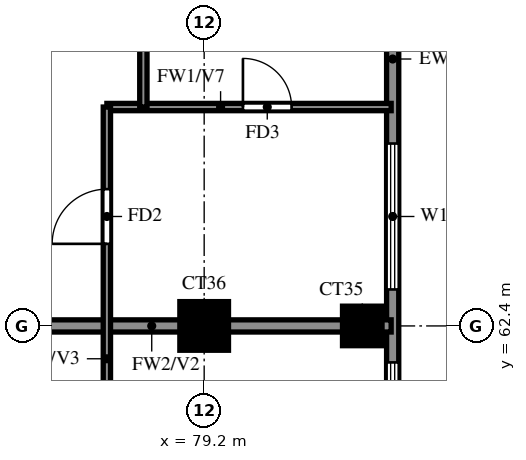
"""IFC4 building model, lengths in metres.
Left out: names, types, materials, properties, quantities, classifications, styles, units other than length and angle.
Written with IfcOpenShell. Run it as: python <this file> out.ifc"""

import sys

from ifc_helpers import new_model, si_unit, direction, frame, frame_2d, origin, origin_2d, place, context, subcontext, project, spatial, rectangle, extrude, source, transform, mapped, element, fill, save


model = new_model("IFC4")
c1 = context("Model", 3, precision=1e-05, world=origin(), true_north=direction((0.0, 1.0)))
c2 = subcontext(c1, "Body", "Model", "MODEL_VIEW")
j1 = project(units=[si_unit("LENGTHUNIT", "METRE"), si_unit("PLANEANGLEUNIT", "RADIAN")], contexts=[c1])
p1 = place(None, origin())
s1 = spatial("IfcSite", under=j1, at=p1, CompositionType="ELEMENT")
p2 = place(p1, origin())
s2 = spatial("IfcBuilding", under=s1, at=p2, CompositionType="ELEMENT")
p3 = place(p2, frame((0.0, 0.0, 232.5)))
s3 = spatial("IfcBuildingStorey", under=s2, at=p3, CompositionType="ELEMENT", Elevation=232.5)
m1 = source(origin(), c2, "Body", "SweptSolid", [
    extrude(rectangle(XDim=0.8, YDim=0.8, at=origin_2d()), origin(), (0.0, 0.0, 1.0), 3.22),
])
p4 = place(p3, frame((79.2, 62.4, 0.0), z_axis=(0.0, 0.0, 1.0), x_axis=(1.0, 0.0, 0.0)))
e1 = element("IfcColumn", 1, at=p4, inside=s3, PredefinedType="COLUMN", context=c2, shape_type="MappedRepresentation", body=[
    mapped(m1, transform((0.0, 0.0, 0.0))),
])
m2 = source(origin(), c2, "Body", "SweptSolid", [
    extrude(rectangle(XDim=0.65, YDim=0.65, at=origin_2d()), origin(), (0.0, 0.0, 1.0), 3.22),
])
p5 = place(p3, frame((81.8, 62.4, 0.0), z_axis=(0.0, 0.0, 1.0), x_axis=(1.0, 0.0, 0.0)))
e2 = element("IfcColumn", 2, at=p5, inside=s3, PredefinedType="COLUMN", context=c2, shape_type="MappedRepresentation", body=[
    mapped(m2, transform((0.0, 0.0, 0.0))),
])
p6 = place(p3, frame((82.3, 48.2, 0.0), z_axis=(0.0, 0.0, 1.0), x_axis=(0.0, 1.0, 0.0)))
e3 = element("IfcWall", 3, at=p6, inside=s3, PredefinedType="SOLIDWALL", context=c2, shape_type="SweptSolid", body=[
    extrude(rectangle(XDim=28.6, YDim=0.2, at=frame_2d((14.3, 0.0))), origin(), (0.0, 0.0, 1.0), 3.22),
])
p7 = place(p6, frame((4.3, 0.0, 0.0)))
e4 = element("IfcOpeningElement", 4, at=p7, cuts=e3, PredefinedType="OPENING", context=c2, shape_type="SweptSolid", body=[
    extrude(rectangle(XDim=1.8, YDim=2.4, at=frame_2d((0.9, 1.2))), frame((0.0, 0.11, 0.0), z_axis=(0.0, -1.0, 0.0), x_axis=(1.0, 0.0, 0.0)), (0.0, 0.0, 1.0), 0.22),
])
p8 = place(p6, frame((0.6, 0.0, 0.6)))
e5 = element("IfcOpeningElement", 5, at=p8, cuts=e3, PredefinedType="OPENING", context=c2, shape_type="SweptSolid", body=[
    extrude(rectangle(XDim=1.2, YDim=2.4, at=frame_2d((0.6, 1.2))), frame((0.0, 0.11, 0.0), z_axis=(0.0, -1.0, 0.0), x_axis=(1.0, 0.0, 0.0)), (0.0, 0.0, 1.0), 0.22),
])
p9 = place(p6, frame((2.95, 0.0, 0.6)))
e6 = element("IfcOpeningElement", 6, at=p9, cuts=e3, PredefinedType="OPENING", context=c2, shape_type="SweptSolid", body=[
    extrude(rectangle(XDim=0.9, YDim=2.4, at=frame_2d((0.45, 1.2))), frame((0.0, 0.11, 0.0), z_axis=(0.0, -1.0, 0.0), x_axis=(1.0, 0.0, 0.0)), (0.0, 0.0, 1.0), 0.22),
])
p10 = place(p6, frame((11.2, 0.0, 0.6)))
e7 = element("IfcOpeningElement", 7, at=p10, cuts=e3, PredefinedType="OPENING", context=c2, shape_type="SweptSolid", body=[
    extrude(rectangle(XDim=2.4, YDim=2.4, at=frame_2d((1.2, 1.2))), frame((0.0, 0.11, 0.0), z_axis=(0.0, -1.0, 0.0), x_axis=(1.0, 0.0, 0.0)), (0.0, 0.0, 1.0), 0.22),
])
p11 = place(p6, frame((7.45, 0.0, 1.5)))
e8 = element("IfcOpeningElement", 8, at=p11, cuts=e3, PredefinedType="OPENING", context=c2, shape_type="SweptSolid", body=[
    extrude(rectangle(XDim=0.9, YDim=0.9, at=frame_2d((0.45, 0.45))), frame((0.0, 0.11, 0.0), z_axis=(0.0, -1.0, 0.0), x_axis=(1.0, 0.0, 0.0)), (0.0, 0.0, 1.0), 0.22),
])
p12 = place(p6, frame((9.55, 0.0, 1.5)))
e9 = element("IfcOpeningElement", 9, at=p12, cuts=e3, PredefinedType="OPENING", context=c2, shape_type="SweptSolid", body=[
    extrude(rectangle(XDim=0.9, YDim=0.9, at=frame_2d((0.45, 0.45))), frame((0.0, 0.11, 0.0), z_axis=(0.0, -1.0, 0.0), x_axis=(1.0, 0.0, 0.0)), (0.0, 0.0, 1.0), 0.22),
])
p13 = place(p6, frame((14.8, 0.0, 0.6)))
e10 = element("IfcOpeningElement", 10, at=p13, cuts=e3, PredefinedType="OPENING", context=c2, shape_type="SweptSolid", body=[
    extrude(rectangle(XDim=2.4, YDim=2.4, at=frame_2d((1.2, 1.2))), frame((0.0, 0.11, 0.0), z_axis=(0.0, -1.0, 0.0), x_axis=(1.0, 0.0, 0.0)), (0.0, 0.0, 1.0), 0.22),
])
p14 = place(p6, frame((19.15, 0.0, 1.5)))
e11 = element("IfcOpeningElement", 11, at=p14, cuts=e3, PredefinedType="OPENING", context=c2, shape_type="SweptSolid", body=[
    extrude(rectangle(XDim=0.9, YDim=0.9, at=frame_2d((0.45, 0.45))), frame((0.0, 0.11, 0.0), z_axis=(0.0, -1.0, 0.0), x_axis=(1.0, 0.0, 0.0)), (0.0, 0.0, 1.0), 0.22),
])
p15 = place(p6, frame((22.0, 0.0, 0.6)))
e12 = element("IfcOpeningElement", 12, at=p15, cuts=e3, PredefinedType="OPENING", context=c2, shape_type="SweptSolid", body=[
    extrude(rectangle(XDim=2.4, YDim=2.4, at=frame_2d((1.2, 1.2))), frame((0.0, 0.11, 0.0), z_axis=(0.0, -1.0, 0.0), x_axis=(1.0, 0.0, 0.0)), (0.0, 0.0, 1.0), 0.22),
])
p16 = place(p6, frame((25.5, 0.0, 0.6)))
e13 = element("IfcOpeningElement", 13, at=p16, cuts=e3, PredefinedType="OPENING", context=c2, shape_type="SweptSolid", body=[
    extrude(rectangle(XDim=2.4, YDim=2.4, at=frame_2d((1.2, 1.2))), frame((0.0, 0.11, 0.0), z_axis=(0.0, -1.0, 0.0), x_axis=(1.0, 0.0, 0.0)), (0.0, 0.0, 1.0), 0.22),
])
p17 = place(p3, frame((74.4, 62.4, 0.0), z_axis=(0.0, 0.0, 1.0), x_axis=(1.0, 0.0, 0.0)))
e14 = element("IfcWall", 14, at=p17, inside=s3, PredefinedType="SOLIDWALL", context=c2, shape_type="SweptSolid", body=[
    extrude(rectangle(XDim=7.875, YDim=0.2, at=frame_2d((3.938, 0.0))), origin(), (0.0, 0.0, 1.0), 3.22),
])
p18 = place(p3, frame((77.6, 66.0, 0.0), z_axis=(0.0, 0.0, 1.0), x_axis=(1.0, 0.0, 0.0)))
e15 = element("IfcWall", 15, at=p18, inside=s3, PredefinedType="PARTITIONING", context=c2, shape_type="SweptSolid", body=[
    extrude(rectangle(XDim=4.675, YDim=0.12, at=frame_2d((2.337, 0.0))), origin(), (0.0, 0.0, 1.0), 2.32),
])
p19 = place(p18, frame((2.238, 0.0, 0.0)))
e16 = element("IfcOpeningElement", 16, at=p19, cuts=e15, PredefinedType="OPENING", context=c2, shape_type="SweptSolid", body=[
    extrude(rectangle(XDim=0.8, YDim=2.1, at=frame_2d((0.4, 1.05))), frame((0.0, 0.07, 0.0), z_axis=(0.0, -1.0, 0.0), x_axis=(1.0, 0.0, 0.0)), (0.0, 0.0, 1.0), 0.14),
])
p20 = place(p3, frame((77.6, 58.8, 0.0), z_axis=(0.0, 0.0, 1.0), x_axis=(0.0, 1.0, 0.0)))
e17 = element("IfcWall", 17, at=p20, inside=s3, PredefinedType="PARTITIONING", context=c2, shape_type="SweptSolid", body=[
    extrude(rectangle(XDim=7.2, YDim=0.12, at=frame_2d((3.6, 0.0))), origin(), (0.0, 0.0, 1.0), 3.22),
])
p21 = place(p20, frame((1.35, 0.0, 0.0)))
e18 = element("IfcOpeningElement", 18, at=p21, cuts=e17, PredefinedType="OPENING", context=c2, shape_type="SweptSolid", body=[
    extrude(rectangle(XDim=0.9, YDim=2.1, at=frame_2d((0.45, 1.05))), frame((0.0, 0.07, 0.0), z_axis=(0.0, -1.0, 0.0), x_axis=(1.0, 0.0, 0.0)), (0.0, 0.0, 1.0), 0.14),
])
p22 = place(p20, frame((4.95, 0.0, 0.0)))
e19 = element("IfcOpeningElement", 19, at=p22, cuts=e17, PredefinedType="OPENING", context=c2, shape_type="SweptSolid", body=[
    extrude(rectangle(XDim=0.9, YDim=2.1, at=frame_2d((0.45, 1.05))), frame((0.0, 0.07, 0.0), z_axis=(0.0, -1.0, 0.0), x_axis=(1.0, 0.0, 0.0)), (0.0, 0.0, 1.0), 0.14),
])
p23 = place(p3, frame((78.2, 66.0, 0.0), z_axis=(0.0, 0.0, 1.0), x_axis=(0.0, 1.0, 0.0)))
e20 = element("IfcWall", 20, at=p23, inside=s3, PredefinedType="PARTITIONING", context=c2, shape_type="SweptSolid", body=[
    extrude(rectangle(XDim=3.6, YDim=0.12, at=frame_2d((1.8, 0.0))), origin(), (0.0, 0.0, 1.0), 3.22),
])
p24 = place(p10, origin())
e21 = element("IfcWindow", 21, at=p24, inside=s3, PartitioningType="DOUBLE_PANEL_VERTICAL", PredefinedType="WINDOW", context=c2, shape_type="SweptSolid", body=[
    extrude(rectangle(XDim=2.4, YDim=2.4, at=frame_2d((1.2, 1.2))), frame((0.0, 0.03, 0.0), z_axis=(0.0, -1.0, 0.0), x_axis=(1.0, 0.0, 0.0)), (0.0, 0.0, 1.0), 0.06),
])
fill(e7, e21)
p25 = place(p13, origin())
e22 = element("IfcWindow", 22, at=p25, inside=s3, PartitioningType="DOUBLE_PANEL_VERTICAL", PredefinedType="WINDOW", context=c2, shape_type="SweptSolid", body=[
    extrude(rectangle(XDim=2.4, YDim=2.4, at=frame_2d((1.2, 1.2))), frame((0.0, 0.03, 0.0), z_axis=(0.0, -1.0, 0.0), x_axis=(1.0, 0.0, 0.0)), (0.0, 0.0, 1.0), 0.06),
])
fill(e10, e22)
p26 = place(p22, origin())
e23 = element("IfcDoor", 23, at=p26, inside=s3, OperationType="SINGLE_SWING_RIGHT", PredefinedType="DOOR", context=c2, shape_type="SweptSolid", body=[
    extrude(rectangle(XDim=0.9, YDim=2.1, at=frame_2d((0.45, 1.05))), frame((0.0, 0.025, 0.0), z_axis=(0.0, -1.0, 0.0), x_axis=(1.0, 0.0, 0.0)), (0.0, 0.0, 1.0), 0.05),
])
fill(e19, e23)
p27 = place(p19, origin())
e24 = element("IfcDoor", 24, at=p27, inside=s3, OperationType="SINGLE_SWING_LEFT", PredefinedType="DOOR", context=c2, shape_type="SweptSolid", body=[
    extrude(rectangle(XDim=0.8, YDim=2.1, at=frame_2d((0.4, 1.05))), frame((0.0, 0.025, 0.0), z_axis=(0.0, -1.0, 0.0), x_axis=(1.0, 0.0, 0.0)), (0.0, 0.0, 1.0), 0.05),
])
fill(e16, e24)
save(model, sys.argv[1])
